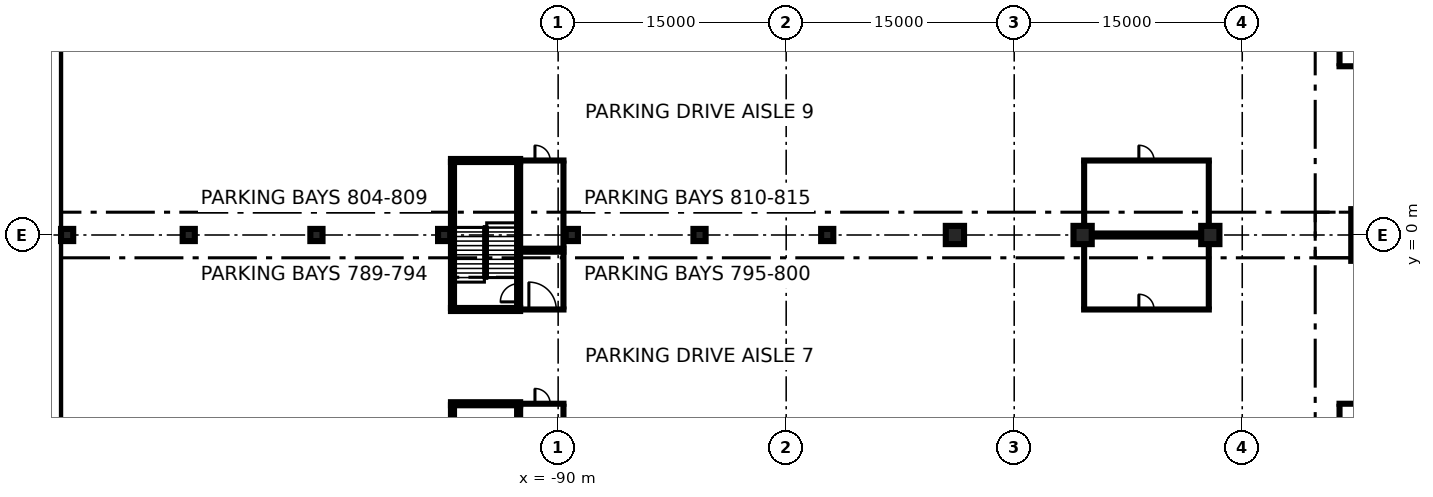
"""IFC4 building model, lengths in metres.
Left out: names, types, materials, properties, quantities, classifications, styles, units other than length and angle.
Written with IfcOpenShell. Run it as: python <this file> out.ifc"""

import sys

from ifc_helpers import new_model, si_unit, direction, frame, frame_2d, origin, origin_2d, place, context, subcontext, project, spatial, rectangle, extrude, element, fill, save


model = new_model("IFC4")
c1 = context("Model", 3, precision=1e-05, world=origin(), true_north=direction((0.0, 1.0)))
c2 = subcontext(c1, "Body", "Model", "MODEL_VIEW")
j1 = project(units=[si_unit("LENGTHUNIT", "METRE"), si_unit("PLANEANGLEUNIT", "RADIAN")], contexts=[c1])
p1 = place(None, origin())
s1 = spatial("IfcSite", under=j1, at=p1, CompositionType="ELEMENT")
p2 = place(p1, origin())
s2 = spatial("IfcBuilding", under=s1, at=p2, CompositionType="ELEMENT")
p3 = place(p2, frame((0.0, 0.0, -12.0)))
s3 = spatial("IfcBuildingStorey", under=s2, at=p3, CompositionType="ELEMENT", Elevation=-12.0)
p4 = place(p3, frame((-123.15, -80.0, 0.0), z_axis=(0.0, 0.0, 1.0), x_axis=(0.0, 1.0, 0.0)))
e1 = element("IfcWall", 1, at=p4, inside=s3, PredefinedType="USERDEFINED", context=c2, shape_type="SweptSolid", body=[
    extrude(rectangle(XDim=160.0, YDim=0.9, at=frame_2d((80.0, 0.0))), origin(), (0.0, 0.0, 1.0), 11.55),
])
p5 = place(p2, frame((0.0, 0.0, -7.2)))
s4 = spatial("IfcBuildingStorey", under=s2, at=p5, CompositionType="ELEMENT", Elevation=-7.2)
p6 = place(p5, frame((-35.729, 0.0, -0.4), z_axis=(0.0, 0.0, 1.0), x_axis=(1.0, 0.0, 0.0)))
e2 = element("IfcColumn", 2, at=p6, inside=s4, PredefinedType="COLUMN", context=c2, shape_type="SweptSolid", body=[
    extrude(rectangle(XDim=4.2, YDim=3.4, at=origin_2d()), origin(), (0.0, 0.0, 1.0), 3.6),
])
for number, where, z_axis, x_axis in (
    (3, (-122.3, 0.0, -0.4), (0.0, 0.0, 1.0), (1.0, 0.0, 0.0)),
    (4, (-114.3, 0.0, -0.4), (0.0, 0.0, 1.0), (1.0, 0.0, 0.0)),
    (5, (-105.9, 0.0, -0.4), (0.0, 0.0, 1.0), (1.0, 0.0, 0.0)),
    (6, (-97.5, 0.0, -0.4), (0.0, 0.0, 1.0), (1.0, 0.0, 0.0)),
    (7, (-89.1, 0.0, -0.4), (0.0, 0.0, 1.0), (1.0, 0.0, 0.0)),
    (8, (-80.7, 0.0, -0.4), (0.0, 0.0, 1.0), (1.0, 0.0, 0.0)),
    (9, (-72.3, 0.0, -0.4), (0.0, 0.0, 1.0), (1.0, 0.0, 0.0)),
):
    element("IfcColumn", number, at=place(p5, frame(where, z_axis=z_axis, x_axis=x_axis)), inside=s4, PredefinedType="COLUMN", context=c2, shape_type="SweptSolid", body=[
        extrude(rectangle(XDim=0.8, YDim=0.8, at=origin_2d()), origin(), (0.0, 0.0, 1.0), 3.6),
    ])
for number, where, z_axis, x_axis in (
    (10, (-63.9, 0.0, -0.4), (0.0, 0.0, 1.0), (1.0, 0.0, 0.0)),
    (11, (-55.5, 0.0, -0.4), (0.0, 0.0, 1.0), (1.0, 0.0, 0.0)),
    (12, (-47.1, 0.0, -0.4), (0.0, 0.0, 1.0), (1.0, 0.0, 0.0)),
):
    element("IfcColumn", number, at=place(p5, frame(where, z_axis=z_axis, x_axis=x_axis)), inside=s4, PredefinedType="COLUMN", context=c2, shape_type="SweptSolid", body=[
        extrude(rectangle(XDim=1.2, YDim=1.2, at=origin_2d()), origin(), (0.0, 0.0, 1.0), 3.6),
    ])
p7 = place(p5, frame((-38.7, -11.1, 0.0), z_axis=(0.0, 0.0, 1.0), x_axis=(1.0, 0.0, 0.0)))
e13 = element("IfcWall", 13, at=p7, inside=s4, PredefinedType="PARTITIONING", context=c2, shape_type="SweptSolid", body=[
    extrude(rectangle(XDim=8.4, YDim=0.2, at=frame_2d((4.2, 0.0))), origin(), (0.0, 0.0, 1.0), 3.2),
])
p8 = place(p7, frame((3.3, 0.0, 0.0)))
e14 = element("IfcOpeningElement", 14, at=p8, cuts=e13, PredefinedType="OPENING", context=c2, shape_type="SweptSolid", body=[
    extrude(rectangle(XDim=1.8, YDim=2.1, at=frame_2d((0.9, 1.05))), frame((0.0, 0.11, 0.0), z_axis=(0.0, -1.0, 0.0), x_axis=(1.0, 0.0, 0.0)), (0.0, 0.0, 1.0), 0.22),
])
p9 = place(p5, frame((-38.6, -15.4, 0.0), z_axis=(0.0, 0.0, 1.0), x_axis=(0.0, 1.0, 0.0)))
e15 = element("IfcWall", 15, at=p9, inside=s4, PredefinedType="PARTITIONING", context=c2, shape_type="SweptSolid", body=[
    extrude(rectangle(XDim=4.2, YDim=0.2, at=frame_2d((2.1, 0.0))), origin(), (0.0, 0.0, 1.0), 3.2),
])
p10 = place(p5, frame((-38.7, 11.1, 0.0), z_axis=(0.0, 0.0, 1.0), x_axis=(1.0, 0.0, 0.0)))
e16 = element("IfcWall", 16, at=p10, inside=s4, PredefinedType="PARTITIONING", context=c2, shape_type="SweptSolid", body=[
    extrude(rectangle(XDim=8.4, YDim=0.2, at=frame_2d((4.2, 0.0))), origin(), (0.0, 0.0, 1.0), 3.2),
])
p11 = place(p10, frame((3.3, 0.0, 0.0)))
e17 = element("IfcOpeningElement", 17, at=p11, cuts=e16, PredefinedType="OPENING", context=c2, shape_type="SweptSolid", body=[
    extrude(rectangle(XDim=1.8, YDim=2.1, at=frame_2d((0.9, 1.05))), frame((0.0, 0.11, 0.0), z_axis=(0.0, -1.0, 0.0), x_axis=(1.0, 0.0, 0.0)), (0.0, 0.0, 1.0), 0.22),
])
p12 = place(p5, frame((-38.6, 11.2, 0.0), z_axis=(0.0, 0.0, 1.0), x_axis=(0.0, 1.0, 0.0)))
e18 = element("IfcWall", 18, at=p12, inside=s4, PredefinedType="PARTITIONING", context=c2, shape_type="SweptSolid", body=[
    extrude(rectangle(XDim=4.2, YDim=0.2, at=frame_2d((2.1, 0.0))), origin(), (0.0, 0.0, 1.0), 3.2),
])
p13 = place(p5, frame((-55.5, -4.9, 0.0), z_axis=(0.0, 0.0, 1.0), x_axis=(1.0, 0.0, 0.0)))
e19 = element("IfcWall", 19, at=p13, inside=s4, PredefinedType="PARTITIONING", context=c2, shape_type="SweptSolid", body=[
    extrude(rectangle(XDim=8.4, YDim=0.2, at=frame_2d((4.2, 0.0))), origin(), (0.0, 0.0, 1.0), 3.2),
])
p14 = place(p13, frame((3.7, 0.0, 0.0)))
e20 = element("IfcOpeningElement", 20, at=p14, cuts=e19, PredefinedType="OPENING", context=c2, shape_type="SweptSolid", body=[
    extrude(rectangle(XDim=1.0, YDim=2.1, at=frame_2d((0.5, 1.05))), frame((0.0, 0.11, 0.0), z_axis=(0.0, -1.0, 0.0), x_axis=(1.0, 0.0, 0.0)), (0.0, 0.0, 1.0), 0.22),
])
p15 = place(p5, frame((-55.5, -0.1, 0.0), z_axis=(0.0, 0.0, 1.0), x_axis=(1.0, 0.0, 0.0)))
e21 = element("IfcWall", 21, at=p15, inside=s4, PredefinedType="PARTITIONING", context=c2, shape_type="SweptSolid", body=[
    extrude(rectangle(XDim=8.4, YDim=0.2, at=frame_2d((4.2, 0.0))), origin(), (0.0, 0.0, 1.0), 3.2),
])
for number, where, z_axis, x_axis in (
    (22, (-55.4, -4.8, 0.0), (0.0, 0.0, 1.0), (0.0, 1.0, 0.0)),
    (23, (-47.2, -4.8, 0.0), (0.0, 0.0, 1.0), (0.0, 1.0, 0.0)),
):
    element("IfcWall", number, at=place(p5, frame(where, z_axis=z_axis, x_axis=x_axis)), inside=s4, PredefinedType="PARTITIONING", context=c2, shape_type="SweptSolid", body=[
        extrude(rectangle(XDim=4.2, YDim=0.2, at=frame_2d((2.1, 0.0))), origin(), (0.0, 0.0, 1.0), 3.2),
    ])
p16 = place(p5, frame((-55.5, 0.1, 0.0), z_axis=(0.0, 0.0, 1.0), x_axis=(1.0, 0.0, 0.0)))
e24 = element("IfcWall", 24, at=p16, inside=s4, PredefinedType="PARTITIONING", context=c2, shape_type="SweptSolid", body=[
    extrude(rectangle(XDim=8.4, YDim=0.2, at=frame_2d((4.2, 0.0))), origin(), (0.0, 0.0, 1.0), 3.2),
])
p17 = place(p5, frame((-55.5, 4.9, 0.0), z_axis=(0.0, 0.0, 1.0), x_axis=(1.0, 0.0, 0.0)))
e25 = element("IfcWall", 25, at=p17, inside=s4, PredefinedType="PARTITIONING", context=c2, shape_type="SweptSolid", body=[
    extrude(rectangle(XDim=8.4, YDim=0.2, at=frame_2d((4.2, 0.0))), origin(), (0.0, 0.0, 1.0), 3.2),
])
p18 = place(p17, frame((3.7, 0.0, 0.0)))
e26 = element("IfcOpeningElement", 26, at=p18, cuts=e25, PredefinedType="OPENING", context=c2, shape_type="SweptSolid", body=[
    extrude(rectangle(XDim=1.0, YDim=2.1, at=frame_2d((0.5, 1.05))), frame((0.0, 0.11, 0.0), z_axis=(0.0, -1.0, 0.0), x_axis=(1.0, 0.0, 0.0)), (0.0, 0.0, 1.0), 0.22),
])
for number, where, z_axis, x_axis in (
    (27, (-55.4, 0.6, 0.0), (0.0, 0.0, 1.0), (0.0, 1.0, 0.0)),
    (28, (-47.2, 0.6, 0.0), (0.0, 0.0, 1.0), (0.0, 1.0, 0.0)),
):
    element("IfcWall", number, at=place(p5, frame(where, z_axis=z_axis, x_axis=x_axis)), inside=s4, PredefinedType="PARTITIONING", context=c2, shape_type="SweptSolid", body=[
        extrude(rectangle(XDim=4.2, YDim=0.2, at=frame_2d((2.1, 0.0))), origin(), (0.0, 0.0, 1.0), 3.2),
    ])
p19 = place(p5, frame((-92.5, -11.1, 0.0), z_axis=(0.0, 0.0, 1.0), x_axis=(1.0, 0.0, 0.0)))
e29 = element("IfcWall", 29, at=p19, inside=s4, PredefinedType="PARTITIONING", context=c2, shape_type="SweptSolid", body=[
    extrude(rectangle(XDim=2.95, YDim=0.2, at=frame_2d((1.475, 0.0))), origin(), (0.0, 0.0, 1.0), 3.2),
])
p20 = place(p19, frame((0.975, 0.0, 0.0)))
e30 = element("IfcOpeningElement", 30, at=p20, cuts=e29, PredefinedType="OPENING", context=c2, shape_type="SweptSolid", body=[
    extrude(rectangle(XDim=1.0, YDim=2.1, at=frame_2d((0.5, 1.05))), frame((0.0, 0.11, 0.0), z_axis=(0.0, -1.0, 0.0), x_axis=(1.0, 0.0, 0.0)), (0.0, 0.0, 1.0), 0.22),
])
p21 = place(p5, frame((-89.65, -16.8, 0.0), z_axis=(0.0, 0.0, 1.0), x_axis=(0.0, 1.0, 0.0)))
e31 = element("IfcWall", 31, at=p21, inside=s4, PredefinedType="PARTITIONING", context=c2, shape_type="SweptSolid", body=[
    extrude(rectangle(XDim=5.6, YDim=0.2, at=frame_2d((2.8, 0.0))), origin(), (0.0, 0.0, 1.0), 3.2),
])
p22 = place(p5, frame((-92.5, -4.9, 0.0), z_axis=(0.0, 0.0, 1.0), x_axis=(1.0, 0.0, 0.0)))
e32 = element("IfcWall", 32, at=p22, inside=s4, PredefinedType="PARTITIONING", context=c2, shape_type="SweptSolid", body=[
    extrude(rectangle(XDim=2.95, YDim=0.2, at=frame_2d((1.475, 0.0))), origin(), (0.0, 0.0, 1.0), 3.2),
])
p23 = place(p22, frame((0.575, 0.0, 0.0)))
e33 = element("IfcOpeningElement", 33, at=p23, cuts=e32, PredefinedType="OPENING", context=c2, shape_type="SweptSolid", body=[
    extrude(rectangle(XDim=1.8, YDim=2.1, at=frame_2d((0.9, 1.05))), frame((0.0, 0.11, 0.0), z_axis=(0.0, -1.0, 0.0), x_axis=(1.0, 0.0, 0.0)), (0.0, 0.0, 1.0), 0.22),
])
p24 = place(p5, frame((-92.5, -1.1, 0.0), z_axis=(0.0, 0.0, 1.0), x_axis=(1.0, 0.0, 0.0)))
e34 = element("IfcWall", 34, at=p24, inside=s4, PredefinedType="PARTITIONING", context=c2, shape_type="SweptSolid", body=[
    extrude(rectangle(XDim=2.95, YDim=0.2, at=frame_2d((1.475, 0.0))), origin(), (0.0, 0.0, 1.0), 3.2),
])
p25 = place(p5, frame((-89.65, -4.8, 0.0), z_axis=(0.0, 0.0, 1.0), x_axis=(0.0, 1.0, 0.0)))
e35 = element("IfcWall", 35, at=p25, inside=s4, PredefinedType="PARTITIONING", context=c2, shape_type="SweptSolid", body=[
    extrude(rectangle(XDim=3.6, YDim=0.2, at=frame_2d((1.8, 0.0))), origin(), (0.0, 0.0, 1.0), 3.2),
])
p26 = place(p5, frame((-92.5, -0.9, 0.0), z_axis=(0.0, 0.0, 1.0), x_axis=(1.0, 0.0, 0.0)))
e36 = element("IfcWall", 36, at=p26, inside=s4, PredefinedType="PARTITIONING", context=c2, shape_type="SweptSolid", body=[
    extrude(rectangle(XDim=2.95, YDim=0.2, at=frame_2d((1.475, 0.0))), origin(), (0.0, 0.0, 1.0), 3.2),
])
p27 = place(p5, frame((-92.5, 4.9, 0.0), z_axis=(0.0, 0.0, 1.0), x_axis=(1.0, 0.0, 0.0)))
e37 = element("IfcWall", 37, at=p27, inside=s4, PredefinedType="PARTITIONING", context=c2, shape_type="SweptSolid", body=[
    extrude(rectangle(XDim=2.95, YDim=0.2, at=frame_2d((1.475, 0.0))), origin(), (0.0, 0.0, 1.0), 3.2),
])
p28 = place(p27, frame((0.975, 0.0, 0.0)))
e38 = element("IfcOpeningElement", 38, at=p28, cuts=e37, PredefinedType="OPENING", context=c2, shape_type="SweptSolid", body=[
    extrude(rectangle(XDim=1.0, YDim=2.1, at=frame_2d((0.5, 1.05))), frame((0.0, 0.11, 0.0), z_axis=(0.0, -1.0, 0.0), x_axis=(1.0, 0.0, 0.0)), (0.0, 0.0, 1.0), 0.22),
])
p29 = place(p5, frame((-89.65, -0.8, 0.0), z_axis=(0.0, 0.0, 1.0), x_axis=(0.0, 1.0, 0.0)))
e39 = element("IfcWall", 39, at=p29, inside=s4, PredefinedType="PARTITIONING", context=c2, shape_type="SweptSolid", body=[
    extrude(rectangle(XDim=5.6, YDim=0.2, at=frame_2d((2.8, 0.0))), origin(), (0.0, 0.0, 1.0), 3.2),
])
p30 = place(p5, frame((-96.95, -20.8, 0.0), z_axis=(0.0, 0.0, 1.0), x_axis=(0.0, 1.0, 0.0)))
e40 = element("IfcWall", 40, at=p30, inside=s4, PredefinedType="SOLIDWALL", context=c2, shape_type="SweptSolid", body=[
    extrude(rectangle(XDim=9.6, YDim=0.2, at=frame_2d((4.8, 0.0))), origin(), (0.0, 0.0, 1.0), 3.2),
])
p31 = place(p5, frame((-92.6, -20.8, 0.0), z_axis=(0.0, 0.0, 1.0), x_axis=(0.0, 1.0, 0.0)))
e41 = element("IfcWall", 41, at=p31, inside=s4, PredefinedType="SOLIDWALL", context=c2, shape_type="SweptSolid", body=[
    extrude(rectangle(XDim=9.6, YDim=0.2, at=frame_2d((4.8, 0.0))), origin(), (0.0, 0.0, 1.0), 3.2),
])
p32 = place(p31, frame((0.4, 0.0, 0.0)))
e42 = element("IfcOpeningElement", 42, at=p32, cuts=e41, PredefinedType="OPENING", context=c2, shape_type="SweptSolid", body=[
    extrude(rectangle(XDim=1.2, YDim=2.1, at=frame_2d((0.6, 1.05))), frame((0.0, 0.11, 0.0), z_axis=(0.0, -1.0, 0.0), x_axis=(1.0, 0.0, 0.0)), (0.0, 0.0, 1.0), 0.22),
])
p33 = place(p5, frame((-97.05, -11.1, 0.0), z_axis=(0.0, 0.0, 1.0), x_axis=(1.0, 0.0, 0.0)))
e43 = element("IfcWall", 43, at=p33, inside=s4, PredefinedType="SOLIDWALL", context=c2, shape_type="SweptSolid", body=[
    extrude(rectangle(XDim=4.55, YDim=0.2, at=frame_2d((2.275, 0.0))), origin(), (0.0, 0.0, 1.0), 3.2),
])
p34 = place(p5, frame((-96.95, -4.8, 0.0), z_axis=(0.0, 0.0, 1.0), x_axis=(0.0, 1.0, 0.0)))
e44 = element("IfcWall", 44, at=p34, inside=s4, PredefinedType="SOLIDWALL", context=c2, shape_type="SweptSolid", body=[
    extrude(rectangle(XDim=9.6, YDim=0.2, at=frame_2d((4.8, 0.0))), origin(), (0.0, 0.0, 1.0), 3.2),
])
p35 = place(p5, frame((-92.6, -4.8, 0.0), z_axis=(0.0, 0.0, 1.0), x_axis=(0.0, 1.0, 0.0)))
e45 = element("IfcWall", 45, at=p35, inside=s4, PredefinedType="SOLIDWALL", context=c2, shape_type="SweptSolid", body=[
    extrude(rectangle(XDim=9.6, YDim=0.2, at=frame_2d((4.8, 0.0))), origin(), (0.0, 0.0, 1.0), 3.2),
])
p36 = place(p35, frame((0.4, 0.0, 0.0)))
e46 = element("IfcOpeningElement", 46, at=p36, cuts=e45, PredefinedType="OPENING", context=c2, shape_type="SweptSolid", body=[
    extrude(rectangle(XDim=1.2, YDim=2.1, at=frame_2d((0.6, 1.05))), frame((0.0, 0.11, 0.0), z_axis=(0.0, -1.0, 0.0), x_axis=(1.0, 0.0, 0.0)), (0.0, 0.0, 1.0), 0.22),
])
for number, where, z_axis, x_axis in (
    (47, (-92.5, -4.9, 0.0), (0.0, 0.0, 1.0), (-1.0, 0.0, 0.0)),
    (48, (-97.05, 4.9, 0.0), (0.0, 0.0, 1.0), (1.0, 0.0, 0.0)),
):
    element("IfcWall", number, at=place(p5, frame(where, z_axis=z_axis, x_axis=x_axis)), inside=s4, PredefinedType="SOLIDWALL", context=c2, shape_type="SweptSolid", body=[
        extrude(rectangle(XDim=4.55, YDim=0.2, at=frame_2d((2.275, 0.0))), origin(), (0.0, 0.0, 1.0), 3.2),
    ])
p37 = place(p14, origin())
e49 = element("IfcDoor", 49, at=p37, inside=s4, OperationType="SINGLE_SWING_LEFT", PredefinedType="DOOR", context=c2, shape_type="SweptSolid", body=[
    extrude(rectangle(XDim=1.0, YDim=2.1, at=frame_2d((0.5, 1.05))), frame((0.0, 0.025, 0.0), z_axis=(0.0, -1.0, 0.0), x_axis=(1.0, 0.0, 0.0)), (0.0, 0.0, 1.0), 0.05),
])
fill(e20, e49)
p38 = place(p18, origin())
e50 = element("IfcDoor", 50, at=p38, inside=s4, OperationType="SINGLE_SWING_LEFT", PredefinedType="DOOR", context=c2, shape_type="SweptSolid", body=[
    extrude(rectangle(XDim=1.0, YDim=2.1, at=frame_2d((0.5, 1.05))), frame((0.0, 0.025, 0.0), z_axis=(0.0, -1.0, 0.0), x_axis=(1.0, 0.0, 0.0)), (0.0, 0.0, 1.0), 0.05),
])
fill(e26, e50)
p39 = place(p20, origin())
e51 = element("IfcDoor", 51, at=p39, inside=s4, OperationType="SINGLE_SWING_LEFT", PredefinedType="DOOR", context=c2, shape_type="SweptSolid", body=[
    extrude(rectangle(XDim=1.0, YDim=2.1, at=frame_2d((0.5, 1.05))), frame((0.0, 0.025, 0.0), z_axis=(0.0, -1.0, 0.0), x_axis=(1.0, 0.0, 0.0)), (0.0, 0.0, 1.0), 0.05),
])
fill(e30, e51)
p40 = place(p23, origin())
e52 = element("IfcDoor", 52, at=p40, inside=s4, OperationType="DOUBLE_DOOR_SINGLE_SWING", PredefinedType="DOOR", context=c2, shape_type="SweptSolid", body=[
    extrude(rectangle(XDim=1.8, YDim=2.1, at=frame_2d((0.9, 1.05))), frame((0.0, 0.025, 0.0), z_axis=(0.0, -1.0, 0.0), x_axis=(1.0, 0.0, 0.0)), (0.0, 0.0, 1.0), 0.05),
])
fill(e33, e52)
p41 = place(p28, origin())
e53 = element("IfcDoor", 53, at=p41, inside=s4, OperationType="SINGLE_SWING_LEFT", PredefinedType="DOOR", context=c2, shape_type="SweptSolid", body=[
    extrude(rectangle(XDim=1.0, YDim=2.1, at=frame_2d((0.5, 1.05))), frame((0.0, 0.025, 0.0), z_axis=(0.0, -1.0, 0.0), x_axis=(1.0, 0.0, 0.0)), (0.0, 0.0, 1.0), 0.05),
])
fill(e38, e53)
p42 = place(p36, origin())
e54 = element("IfcDoor", 54, at=p42, inside=s4, OperationType="SINGLE_SWING_LEFT", PredefinedType="DOOR", context=c2, shape_type="SweptSolid", body=[
    extrude(rectangle(XDim=1.2, YDim=2.1, at=frame_2d((0.6, 1.05))), frame((0.0, 0.025, 0.0), z_axis=(0.0, -1.0, 0.0), x_axis=(1.0, 0.0, 0.0)), (0.0, 0.0, 1.0), 0.05),
])
fill(e46, e54)
save(model, sys.argv[1])
